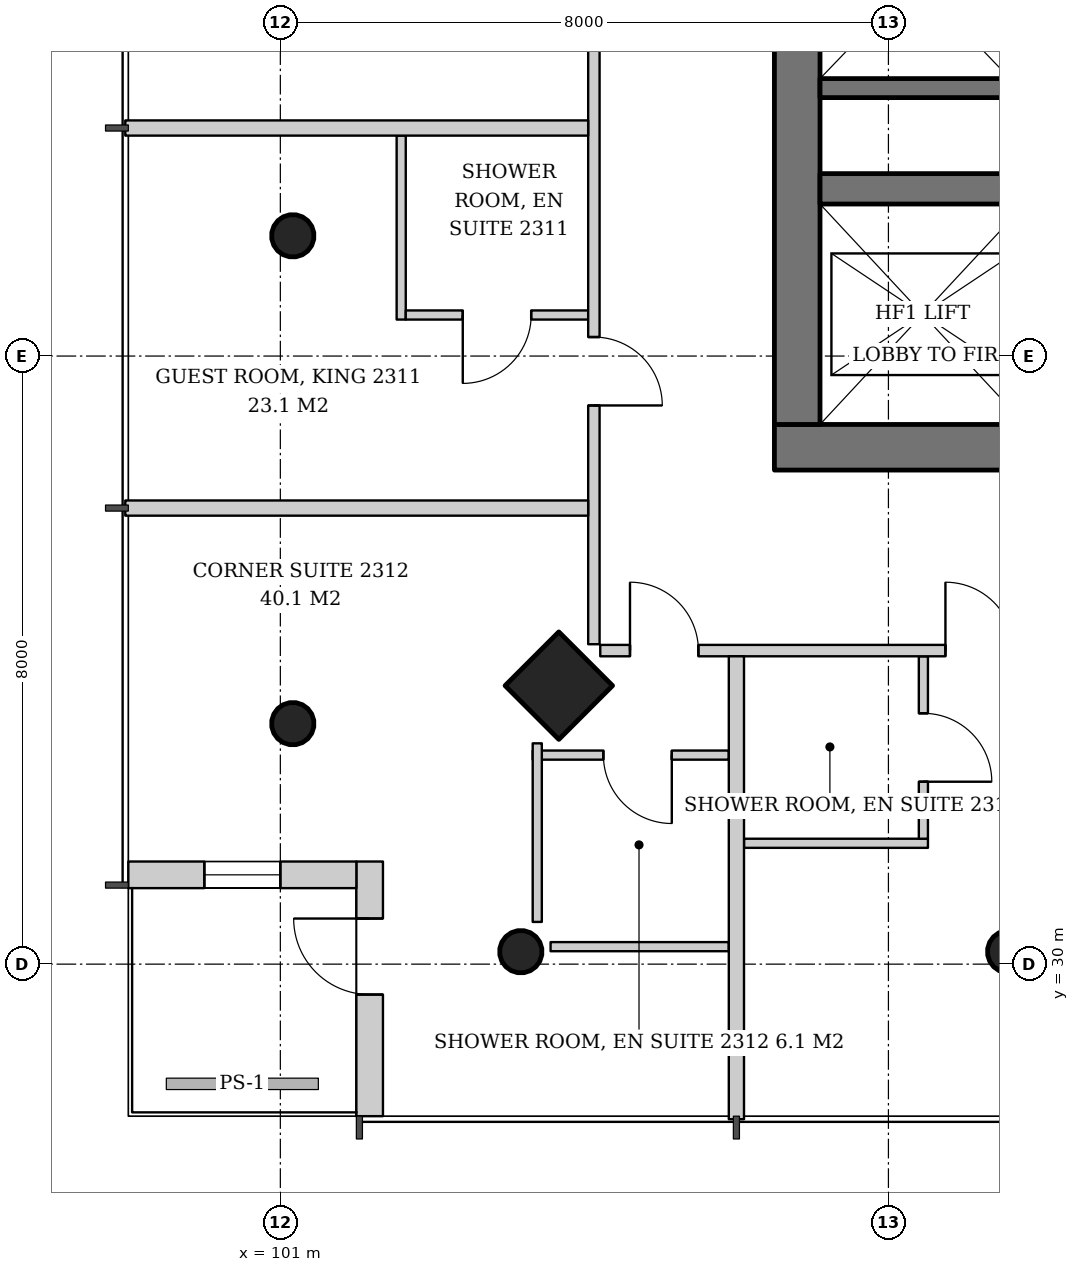
"""IFC4 building model, lengths in metres.
Left out: names, types, materials, properties, quantities, classifications, styles, units other than length and angle.
Written with IfcOpenShell. Run it as: python <this file> out.ifc"""

import sys

from ifc_helpers import new_model, si_unit, direction, frame, frame_2d, origin, origin_2d, place, context, subcontext, project, spatial, rectangle, hollow_circle, extrude, element, fill, save


model = new_model("IFC4")
c1 = context("Model", 3, precision=1e-05, world=origin(), true_north=direction((0.0, 1.0)))
c2 = subcontext(c1, "Body", "Model", "MODEL_VIEW")
j1 = project(units=[si_unit("LENGTHUNIT", "METRE"), si_unit("PLANEANGLEUNIT", "RADIAN")], contexts=[c1])
p1 = place(None, origin())
s1 = spatial("IfcSite", under=j1, at=p1, CompositionType="ELEMENT")
p2 = place(p1, origin())
s2 = spatial("IfcBuilding", under=s1, at=p2, CompositionType="ELEMENT")
p3 = place(p2, frame((0.0, 0.0, 93.2)))
s3 = spatial("IfcBuildingStorey", under=s2, at=p3, CompositionType="ELEMENT", Elevation=93.2)
p4 = place(p3, frame((104.612, 33.612, 0.0), z_axis=(0.043029647111, 0.043029647111, 0.998146732169), x_axis=(-0.707106781187, 0.707106781187, 0.0)))
e1 = element("IfcColumn", 1, at=p4, inside=s3, PredefinedType="COLUMN", context=c2, shape_type="SweptSolid", body=[
    extrude(rectangle(XDim=1.0, YDim=1.0, at=origin_2d()), origin(), (0.0, 0.0, 1.0), 3.807),
])
p5 = place(p3, frame((101.112, 33.112, 0.0), z_axis=(0.043029647111, 0.043029647111, 0.998146732169), x_axis=(-0.707106781187, 0.707106781187, 0.0)))
e2 = element("IfcColumn", 2, at=p5, inside=s3, PredefinedType="COLUMN", context=c2, shape_type="SweptSolid", body=[
    extrude(hollow_circle(Radius=0.28, WallThickness=0.02, at=origin_2d()), origin(), (0.0, 0.0, 1.0), 3.807),
])
p6 = place(p3, frame((101.112, 39.556, 0.0), z_axis=(0.043059584825, 0.021497706284, 0.998841188968), x_axis=(-0.446680166538, 0.894693706707, 0.0)))
e3 = element("IfcColumn", 3, at=p6, inside=s3, PredefinedType="COLUMN", context=c2, shape_type="SweptSolid", body=[
    extrude(hollow_circle(Radius=0.28, WallThickness=0.02, at=origin_2d()), origin(), (0.0, 0.0, 1.0), 3.804),
])
p7 = place(p3, frame((104.112, 30.112, 0.0), z_axis=(0.043029647111, 0.043029647111, 0.998146732169), x_axis=(-0.707106781187, 0.707106781187, 0.0)))
e4 = element("IfcColumn", 4, at=p7, inside=s3, PredefinedType="COLUMN", context=c2, shape_type="SweptSolid", body=[
    extrude(hollow_circle(Radius=0.28, WallThickness=0.02, at=origin_2d()), origin(), (0.0, 0.0, 1.0), 3.807),
])
p8 = place(p3, frame((110.556, 30.112, 0.0), z_axis=(0.021497706284, 0.043059584825, 0.998841188968), x_axis=(-0.894693706707, 0.446680166538, 0.0)))
e5 = element("IfcColumn", 5, at=p8, inside=s3, PredefinedType="COLUMN", context=c2, shape_type="SweptSolid", body=[
    extrude(hollow_circle(Radius=0.28, WallThickness=0.02, at=origin_2d()), origin(), (0.0, 0.0, 1.0), 3.804),
])
p9 = place(p3, frame((107.5, 36.8, 0.0), z_axis=(0.0, 0.0, 1.0), x_axis=(1.0, 0.0, 0.0)))
e6 = element("IfcWall", 6, at=p9, inside=s3, PredefinedType="SHEAR", context=c2, shape_type="SweptSolid", body=[
    extrude(rectangle(XDim=19.0, YDim=0.6, at=frame_2d((9.5, 0.0))), origin(), (0.0, 0.0, 1.0), 3.8),
])
p10 = place(p9, frame((3.9, 0.0, 0.0)))
e7 = element("IfcOpeningElement", 7, at=p10, cuts=e6, PredefinedType="OPENING", context=c2, shape_type="SweptSolid", body=[
    extrude(rectangle(XDim=1.0, YDim=2.1, at=frame_2d((0.5, 1.05))), frame((0.0, 0.31, 0.0), z_axis=(0.0, -1.0, 0.0), x_axis=(1.0, 0.0, 0.0)), (0.0, 0.0, 1.0), 0.62),
])
p11 = place(p9, frame((14.107, 0.0, 0.0)))
e8 = element("IfcOpeningElement", 8, at=p11, cuts=e6, PredefinedType="OPENING", context=c2, shape_type="SweptSolid", body=[
    extrude(rectangle(XDim=1.0, YDim=2.1, at=frame_2d((0.5, 1.05))), frame((0.0, 0.31, 0.0), z_axis=(0.0, -1.0, 0.0), x_axis=(1.0, 0.0, 0.0)), (0.0, 0.0, 1.0), 0.62),
])
p12 = place(p9, frame((15.638, 0.0, 0.0)))
e9 = element("IfcOpeningElement", 9, at=p12, cuts=e6, PredefinedType="OPENING", context=c2, shape_type="SweptSolid", body=[
    extrude(rectangle(XDim=1.0, YDim=2.1, at=frame_2d((0.5, 1.05))), frame((0.0, 0.31, 0.0), z_axis=(0.0, -1.0, 0.0), x_axis=(1.0, 0.0, 0.0)), (0.0, 0.0, 1.0), 0.62),
])
p13 = place(p9, frame((17.142, 0.0, 0.0)))
e10 = element("IfcOpeningElement", 10, at=p13, cuts=e6, PredefinedType="OPENING", context=c2, shape_type="SweptSolid", body=[
    extrude(rectangle(XDim=1.0, YDim=2.1, at=frame_2d((0.5, 1.05))), frame((0.0, 0.31, 0.0), z_axis=(0.0, -1.0, 0.0), x_axis=(1.0, 0.0, 0.0)), (0.0, 0.0, 1.0), 0.62),
])
p14 = place(p3, frame((107.8, 37.1, 0.0), z_axis=(0.0, 0.0, 1.0), x_axis=(0.0, 1.0, 0.0)))
e11 = element("IfcWall", 11, at=p14, inside=s3, PredefinedType="SHEAR", context=c2, shape_type="SweptSolid", body=[
    extrude(rectangle(XDim=17.8, YDim=0.6, at=frame_2d((8.9, 0.0))), origin(), (0.0, 0.0, 1.0), 3.8),
])
p15 = place(p14, frame((8.0, 0.0, 0.0)))
e12 = element("IfcOpeningElement", 12, at=p15, cuts=e11, PredefinedType="OPENING", context=c2, shape_type="SweptSolid", body=[
    extrude(rectangle(XDim=1.8, YDim=2.4, at=frame_2d((0.9, 1.2))), frame((0.0, 0.31, 0.0), z_axis=(0.0, -1.0, 0.0), x_axis=(1.0, 0.0, 0.0)), (0.0, 0.0, 1.0), 0.62),
])
p16 = place(p3, frame((108.1, 40.2, 0.0), z_axis=(0.0, 0.0, 1.0), x_axis=(1.0, 0.0, 0.0)))
e13 = element("IfcWall", 13, at=p16, inside=s3, PredefinedType="SHEAR", context=c2, shape_type="SweptSolid", body=[
    extrude(rectangle(XDim=17.8, YDim=0.4, at=frame_2d((8.9, 0.0))), origin(), (0.0, 0.0, 1.0), 3.8),
])
p17 = place(p3, frame((102.175, 28.0, 0.0), z_axis=(0.0, 0.0, 1.0), x_axis=(0.0, 1.0, 0.0)))
e14 = element("IfcWall", 14, at=p17, inside=s3, PredefinedType="SOLIDWALL", context=c2, shape_type="SweptSolid", body=[
    extrude(rectangle(XDim=3.35, YDim=0.35, at=frame_2d((1.675, 0.0))), origin(), (0.0, 0.0, 1.0), 3.6),
])
p18 = place(p17, frame((1.6, 0.0, 0.0)))
e15 = element("IfcOpeningElement", 15, at=p18, cuts=e14, PredefinedType="OPENING", context=c2, shape_type="SweptSolid", body=[
    extrude(rectangle(XDim=1.0, YDim=2.4, at=frame_2d((0.5, 1.2))), frame((0.0, 0.185, 0.0), z_axis=(0.0, -1.0, 0.0), x_axis=(1.0, 0.0, 0.0)), (0.0, 0.0, 1.0), 0.37),
])
p19 = place(p3, frame((102.0, 31.175, 0.0), z_axis=(0.0, 0.0, 1.0), x_axis=(-1.0, 0.0, 0.0)))
e16 = element("IfcWall", 16, at=p19, inside=s3, PredefinedType="SOLIDWALL", context=c2, shape_type="SweptSolid", body=[
    extrude(rectangle(XDim=3.0, YDim=0.35, at=frame_2d((1.5, 0.0))), origin(), (0.0, 0.0, 1.0), 3.6),
])
p20 = place(p19, frame((1.0, 0.0, 0.9)))
e17 = element("IfcOpeningElement", 17, at=p20, cuts=e16, PredefinedType="OPENING", context=c2, shape_type="SweptSolid", body=[
    extrude(rectangle(XDim=1.0, YDim=2.4, at=frame_2d((0.5, 1.2))), frame((0.0, 0.185, 0.0), z_axis=(0.0, -1.0, 0.0), x_axis=(1.0, 0.0, 0.0)), (0.0, 0.0, 1.0), 0.37),
])
p21 = place(p3, frame((108.1, 41.525, 0.0), z_axis=(0.0, 0.0, 1.0), x_axis=(1.0, 0.0, 0.0)))
e18 = element("IfcWall", 18, at=p21, inside=s3, PredefinedType="SHEAR", context=c2, shape_type="SweptSolid", body=[
    extrude(rectangle(XDim=11.0, YDim=0.25, at=frame_2d((5.5, 0.0))), origin(), (0.0, 0.0, 1.0), 3.8),
])
p22 = place(p3, frame((102.59, 40.9, 0.0), z_axis=(0.0, 0.0, 1.0), x_axis=(0.0, -1.0, 0.0)))
e19 = element("IfcWall", 19, at=p22, inside=s3, PredefinedType="PARTITIONING", context=c2, shape_type="SweptSolid", body=[
    extrude(rectangle(XDim=2.42, YDim=0.12, at=frame_2d((1.21, 0.0))), origin(), (0.0, 0.0, 1.0), 3.0),
])
p23 = place(p3, frame((105.05, 38.54, 0.0), z_axis=(0.0, 0.0, 1.0), x_axis=(-1.0, 0.0, 0.0)))
e20 = element("IfcWall", 20, at=p23, inside=s3, PredefinedType="PARTITIONING", context=c2, shape_type="SweptSolid", body=[
    extrude(rectangle(XDim=2.4, YDim=0.12, at=frame_2d((1.2, 0.0))), origin(), (0.0, 0.0, 1.0), 3.0),
])
p24 = place(p23, frame((0.75, 0.0, 0.0)))
e21 = element("IfcOpeningElement", 21, at=p24, cuts=e20, PredefinedType="OPENING", context=c2, shape_type="SweptSolid", body=[
    extrude(rectangle(XDim=0.9, YDim=2.1, at=frame_2d((0.45, 1.05))), frame((0.0, 0.07, 0.0), z_axis=(0.0, -1.0, 0.0), x_axis=(1.0, 0.0, 0.0)), (0.0, 0.0, 1.0), 0.14),
])
p25 = place(p3, frame((105.125, 57.791, 0.0), z_axis=(0.0, 0.0, 1.0), x_axis=(0.0, -1.0, 0.0)))
e22 = element("IfcWall", 22, at=p25, inside=s3, PredefinedType="PARTITIONING", context=c2, shape_type="SweptSolid", body=[
    extrude(rectangle(XDim=23.583, YDim=0.15, at=frame_2d((11.791, 0.0))), origin(), (0.0, 0.0, 1.0), 2.9),
])
p26 = place(p25, frame((0.391, 0.0, 0.0)))
e23 = element("IfcOpeningElement", 23, at=p26, cuts=e22, PredefinedType="OPENING", context=c2, shape_type="SweptSolid", body=[
    extrude(rectangle(XDim=0.9, YDim=2.1, at=frame_2d((0.45, 1.05))), frame((0.0, 0.085, 0.0), z_axis=(0.0, -1.0, 0.0), x_axis=(1.0, 0.0, 0.0)), (0.0, 0.0, 1.0), 0.17),
])
p27 = place(p25, frame((4.541, 0.0, 0.0)))
e24 = element("IfcOpeningElement", 24, at=p27, cuts=e22, PredefinedType="OPENING", context=c2, shape_type="SweptSolid", body=[
    extrude(rectangle(XDim=0.9, YDim=2.1, at=frame_2d((0.45, 1.05))), frame((0.0, 0.085, 0.0), z_axis=(0.0, -1.0, 0.0), x_axis=(1.0, 0.0, 0.0)), (0.0, 0.0, 1.0), 0.17),
])
p28 = place(p25, frame((14.491, 0.0, 0.0)))
e25 = element("IfcOpeningElement", 25, at=p28, cuts=e22, PredefinedType="OPENING", context=c2, shape_type="SweptSolid", body=[
    extrude(rectangle(XDim=1.0, YDim=2.1, at=frame_2d((0.5, 1.05))), frame((0.0, 0.085, 0.0), z_axis=(0.0, -1.0, 0.0), x_axis=(1.0, 0.0, 0.0)), (0.0, 0.0, 1.0), 0.17),
])
p29 = place(p25, frame((19.541, 0.0, 0.0)))
e26 = element("IfcOpeningElement", 26, at=p29, cuts=e22, PredefinedType="OPENING", context=c2, shape_type="SweptSolid", body=[
    extrude(rectangle(XDim=0.9, YDim=2.1, at=frame_2d((0.45, 1.05))), frame((0.0, 0.085, 0.0), z_axis=(0.0, -1.0, 0.0), x_axis=(1.0, 0.0, 0.0)), (0.0, 0.0, 1.0), 0.17),
])
for number, where, z_axis, x_axis in (
    (27, (105.05, 41.0, 0.0), (0.0, 0.0, 1.0), (-1.0, 0.0, 0.0)),
    (28, (105.05, 36.0, 0.0), (0.0, 0.0, 1.0), (-1.0, 0.0, 0.0)),
):
    element("IfcWall", number, at=place(p3, frame(where, z_axis=z_axis, x_axis=x_axis)), inside=s3, PredefinedType="PARTITIONING", context=c2, shape_type="SweptSolid", body=[
        extrude(rectangle(XDim=6.09, YDim=0.2, at=frame_2d((3.045, 0.0))), origin(), (0.0, 0.0, 1.0), 3.2),
    ])
p30 = place(p3, frame((106.9, 32.75, 0.0), z_axis=(0.0, 0.0, 1.0), x_axis=(-1.0, 0.0, 0.0)))
e29 = element("IfcWall", 29, at=p30, inside=s3, PredefinedType="PARTITIONING", context=c2, shape_type="SweptSolid", body=[
    extrude(rectangle(XDim=2.58, YDim=0.12, at=frame_2d((1.29, 0.0))), origin(), (0.0, 0.0, 1.0), 3.2),
])
p31 = place(p30, frame((0.75, 0.0, 0.0)))
e30 = element("IfcOpeningElement", 30, at=p31, cuts=e29, PredefinedType="OPENING", context=c2, shape_type="SweptSolid", body=[
    extrude(rectangle(XDim=0.9, YDim=2.1, at=frame_2d((0.45, 1.05))), frame((0.0, 0.07, 0.0), z_axis=(0.0, -1.0, 0.0), x_axis=(1.0, 0.0, 0.0)), (0.0, 0.0, 1.0), 0.14),
])
p32 = place(p3, frame((106.9, 30.23, 0.0), z_axis=(0.0, 0.0, 1.0), x_axis=(-1.0, 0.0, 0.0)))
e31 = element("IfcWall", 31, at=p32, inside=s3, PredefinedType="PARTITIONING", context=c2, shape_type="SweptSolid", body=[
    extrude(rectangle(XDim=2.344, YDim=0.12, at=frame_2d((1.172, 0.0))), origin(), (0.0, 0.0, 1.0), 3.2),
])
p33 = place(p3, frame((104.38, 32.905, 0.0), z_axis=(0.0, 0.0, 1.0), x_axis=(0.0, -1.0, 0.0)))
e32 = element("IfcWall", 32, at=p33, inside=s3, PredefinedType="PARTITIONING", context=c2, shape_type="SweptSolid", body=[
    extrude(rectangle(XDim=2.35, YDim=0.12, at=frame_2d((1.175, 0.0))), origin(), (0.0, 0.0, 1.0), 3.2),
])
p34 = place(p3, frame((107.1, 31.59, 0.0), z_axis=(0.0, 0.0, 1.0), x_axis=(1.0, 0.0, 0.0)))
e33 = element("IfcWall", 33, at=p34, inside=s3, PredefinedType="PARTITIONING", context=c2, shape_type="SweptSolid", body=[
    extrude(rectangle(XDim=2.42, YDim=0.12, at=frame_2d((1.21, 0.0))), origin(), (0.0, 0.0, 1.0), 2.9),
])
p35 = place(p3, frame((109.46, 34.05, 0.0), z_axis=(0.0, 0.0, 1.0), x_axis=(0.0, -1.0, 0.0)))
e34 = element("IfcWall", 34, at=p35, inside=s3, PredefinedType="PARTITIONING", context=c2, shape_type="SweptSolid", body=[
    extrude(rectangle(XDim=2.4, YDim=0.12, at=frame_2d((1.2, 0.0))), origin(), (0.0, 0.0, 1.0), 3.6),
])
p36 = place(p35, frame((0.75, 0.0, 0.0)))
e35 = element("IfcOpeningElement", 35, at=p36, cuts=e34, PredefinedType="OPENING", context=c2, shape_type="SweptSolid", body=[
    extrude(rectangle(XDim=0.9, YDim=2.1, at=frame_2d((0.45, 1.05))), frame((0.0, 0.07, 0.0), z_axis=(0.0, -1.0, 0.0), x_axis=(1.0, 0.0, 0.0)), (0.0, 0.0, 1.0), 0.14),
])
p37 = place(p3, frame((105.209, 34.125, 0.0), z_axis=(0.0, 0.0, 1.0), x_axis=(1.0, 0.0, 0.0)))
e36 = element("IfcWall", 36, at=p37, inside=s3, PredefinedType="PARTITIONING", context=c2, shape_type="SweptSolid", body=[
    extrude(rectangle(XDim=23.583, YDim=0.15, at=frame_2d((11.791, 0.0))), origin(), (0.0, 0.0, 1.0), 2.9),
])
p38 = place(p37, frame((0.391, 0.0, 0.0)))
e37 = element("IfcOpeningElement", 37, at=p38, cuts=e36, PredefinedType="OPENING", context=c2, shape_type="SweptSolid", body=[
    extrude(rectangle(XDim=0.9, YDim=2.1, at=frame_2d((0.45, 1.05))), frame((0.0, 0.085, 0.0), z_axis=(0.0, -1.0, 0.0), x_axis=(1.0, 0.0, 0.0)), (0.0, 0.0, 1.0), 0.17),
])
p39 = place(p37, frame((4.541, 0.0, 0.0)))
e38 = element("IfcOpeningElement", 38, at=p39, cuts=e36, PredefinedType="OPENING", context=c2, shape_type="SweptSolid", body=[
    extrude(rectangle(XDim=0.9, YDim=2.1, at=frame_2d((0.45, 1.05))), frame((0.0, 0.085, 0.0), z_axis=(0.0, -1.0, 0.0), x_axis=(1.0, 0.0, 0.0)), (0.0, 0.0, 1.0), 0.17),
])
p40 = place(p37, frame((14.541, 0.0, 0.0)))
e39 = element("IfcOpeningElement", 39, at=p40, cuts=e36, PredefinedType="OPENING", context=c2, shape_type="SweptSolid", body=[
    extrude(rectangle(XDim=0.9, YDim=2.1, at=frame_2d((0.45, 1.05))), frame((0.0, 0.085, 0.0), z_axis=(0.0, -1.0, 0.0), x_axis=(1.0, 0.0, 0.0)), (0.0, 0.0, 1.0), 0.17),
])
p41 = place(p37, frame((18.141, 0.0, 0.0)))
e40 = element("IfcOpeningElement", 40, at=p41, cuts=e36, PredefinedType="OPENING", context=c2, shape_type="SweptSolid", body=[
    extrude(rectangle(XDim=0.9, YDim=2.1, at=frame_2d((0.45, 1.05))), frame((0.0, 0.085, 0.0), z_axis=(0.0, -1.0, 0.0), x_axis=(1.0, 0.0, 0.0)), (0.0, 0.0, 1.0), 0.17),
])
p42 = place(p3, frame((107.0, 34.05, 0.0), z_axis=(0.0, 0.0, 1.0), x_axis=(0.0, -1.0, 0.0)))
e41 = element("IfcWall", 41, at=p42, inside=s3, PredefinedType="PARTITIONING", context=c2, shape_type="SweptSolid", body=[
    extrude(rectangle(XDim=6.09, YDim=0.2, at=frame_2d((3.045, 0.0))), origin(), (0.0, 0.0, 1.0), 3.2),
])
p43 = place(p18, origin())
e42 = element("IfcDoor", 42, at=p43, inside=s3, OperationType="SINGLE_SWING_RIGHT", PredefinedType="DOOR", context=c2, shape_type="SweptSolid", body=[
    extrude(rectangle(XDim=1.0, YDim=2.4, at=frame_2d((0.5, 1.2))), frame((0.0, 0.025, 0.0), z_axis=(0.0, -1.0, 0.0), x_axis=(1.0, 0.0, 0.0)), (0.0, 0.0, 1.0), 0.05),
])
fill(e15, e42)
p44 = place(p20, origin())
e43 = element("IfcWindow", 43, at=p44, inside=s3, PartitioningType="SINGLE_PANEL", PredefinedType="WINDOW", context=c2, shape_type="SweptSolid", body=[
    extrude(rectangle(XDim=1.0, YDim=2.4, at=frame_2d((0.5, 1.2))), frame((0.0, 0.03, 0.0), z_axis=(0.0, -1.0, 0.0), x_axis=(1.0, 0.0, 0.0)), (0.0, 0.0, 1.0), 0.06),
])
fill(e17, e43)
p45 = place(p24, origin())
e44 = element("IfcDoor", 44, at=p45, inside=s3, OperationType="SINGLE_SWING_RIGHT", PredefinedType="DOOR", context=c2, shape_type="SweptSolid", body=[
    extrude(rectangle(XDim=0.9, YDim=2.1, at=frame_2d((0.45, 1.05))), frame((0.0, 0.025, 0.0), z_axis=(0.0, -1.0, 0.0), x_axis=(1.0, 0.0, 0.0)), (0.0, 0.0, 1.0), 0.05),
])
fill(e21, e44)
p46 = place(p29, origin())
e45 = element("IfcDoor", 45, at=p46, inside=s3, OperationType="SINGLE_SWING_RIGHT", PredefinedType="DOOR", context=c2, shape_type="SweptSolid", body=[
    extrude(rectangle(XDim=0.9, YDim=2.1, at=frame_2d((0.45, 1.05))), frame((0.0, 0.025, 0.0), z_axis=(0.0, -1.0, 0.0), x_axis=(1.0, 0.0, 0.0)), (0.0, 0.0, 1.0), 0.05),
])
fill(e26, e45)
p47 = place(p31, origin())
e46 = element("IfcDoor", 46, at=p47, inside=s3, OperationType="SINGLE_SWING_LEFT", PredefinedType="DOOR", context=c2, shape_type="SweptSolid", body=[
    extrude(rectangle(XDim=0.9, YDim=2.1, at=frame_2d((0.45, 1.05))), frame((0.0, 0.025, 0.0), z_axis=(0.0, -1.0, 0.0), x_axis=(1.0, 0.0, 0.0)), (0.0, 0.0, 1.0), 0.05),
])
fill(e30, e46)
p48 = place(p36, origin())
e47 = element("IfcDoor", 47, at=p48, inside=s3, OperationType="SINGLE_SWING_RIGHT", PredefinedType="DOOR", context=c2, shape_type="SweptSolid", body=[
    extrude(rectangle(XDim=0.9, YDim=2.1, at=frame_2d((0.45, 1.05))), frame((0.0, 0.025, 0.0), z_axis=(0.0, -1.0, 0.0), x_axis=(1.0, 0.0, 0.0)), (0.0, 0.0, 1.0), 0.05),
])
fill(e35, e47)
p49 = place(p38, origin())
e48 = element("IfcDoor", 48, at=p49, inside=s3, OperationType="SINGLE_SWING_LEFT", PredefinedType="DOOR", context=c2, shape_type="SweptSolid", body=[
    extrude(rectangle(XDim=0.9, YDim=2.1, at=frame_2d((0.45, 1.05))), frame((0.0, 0.025, 0.0), z_axis=(0.0, -1.0, 0.0), x_axis=(1.0, 0.0, 0.0)), (0.0, 0.0, 1.0), 0.05),
])
fill(e37, e48)
p50 = place(p39, origin())
e49 = element("IfcDoor", 49, at=p50, inside=s3, OperationType="SINGLE_SWING_LEFT", PredefinedType="DOOR", context=c2, shape_type="SweptSolid", body=[
    extrude(rectangle(XDim=0.9, YDim=2.1, at=frame_2d((0.45, 1.05))), frame((0.0, 0.025, 0.0), z_axis=(0.0, -1.0, 0.0), x_axis=(1.0, 0.0, 0.0)), (0.0, 0.0, 1.0), 0.05),
])
fill(e38, e49)
save(model, sys.argv[1])
